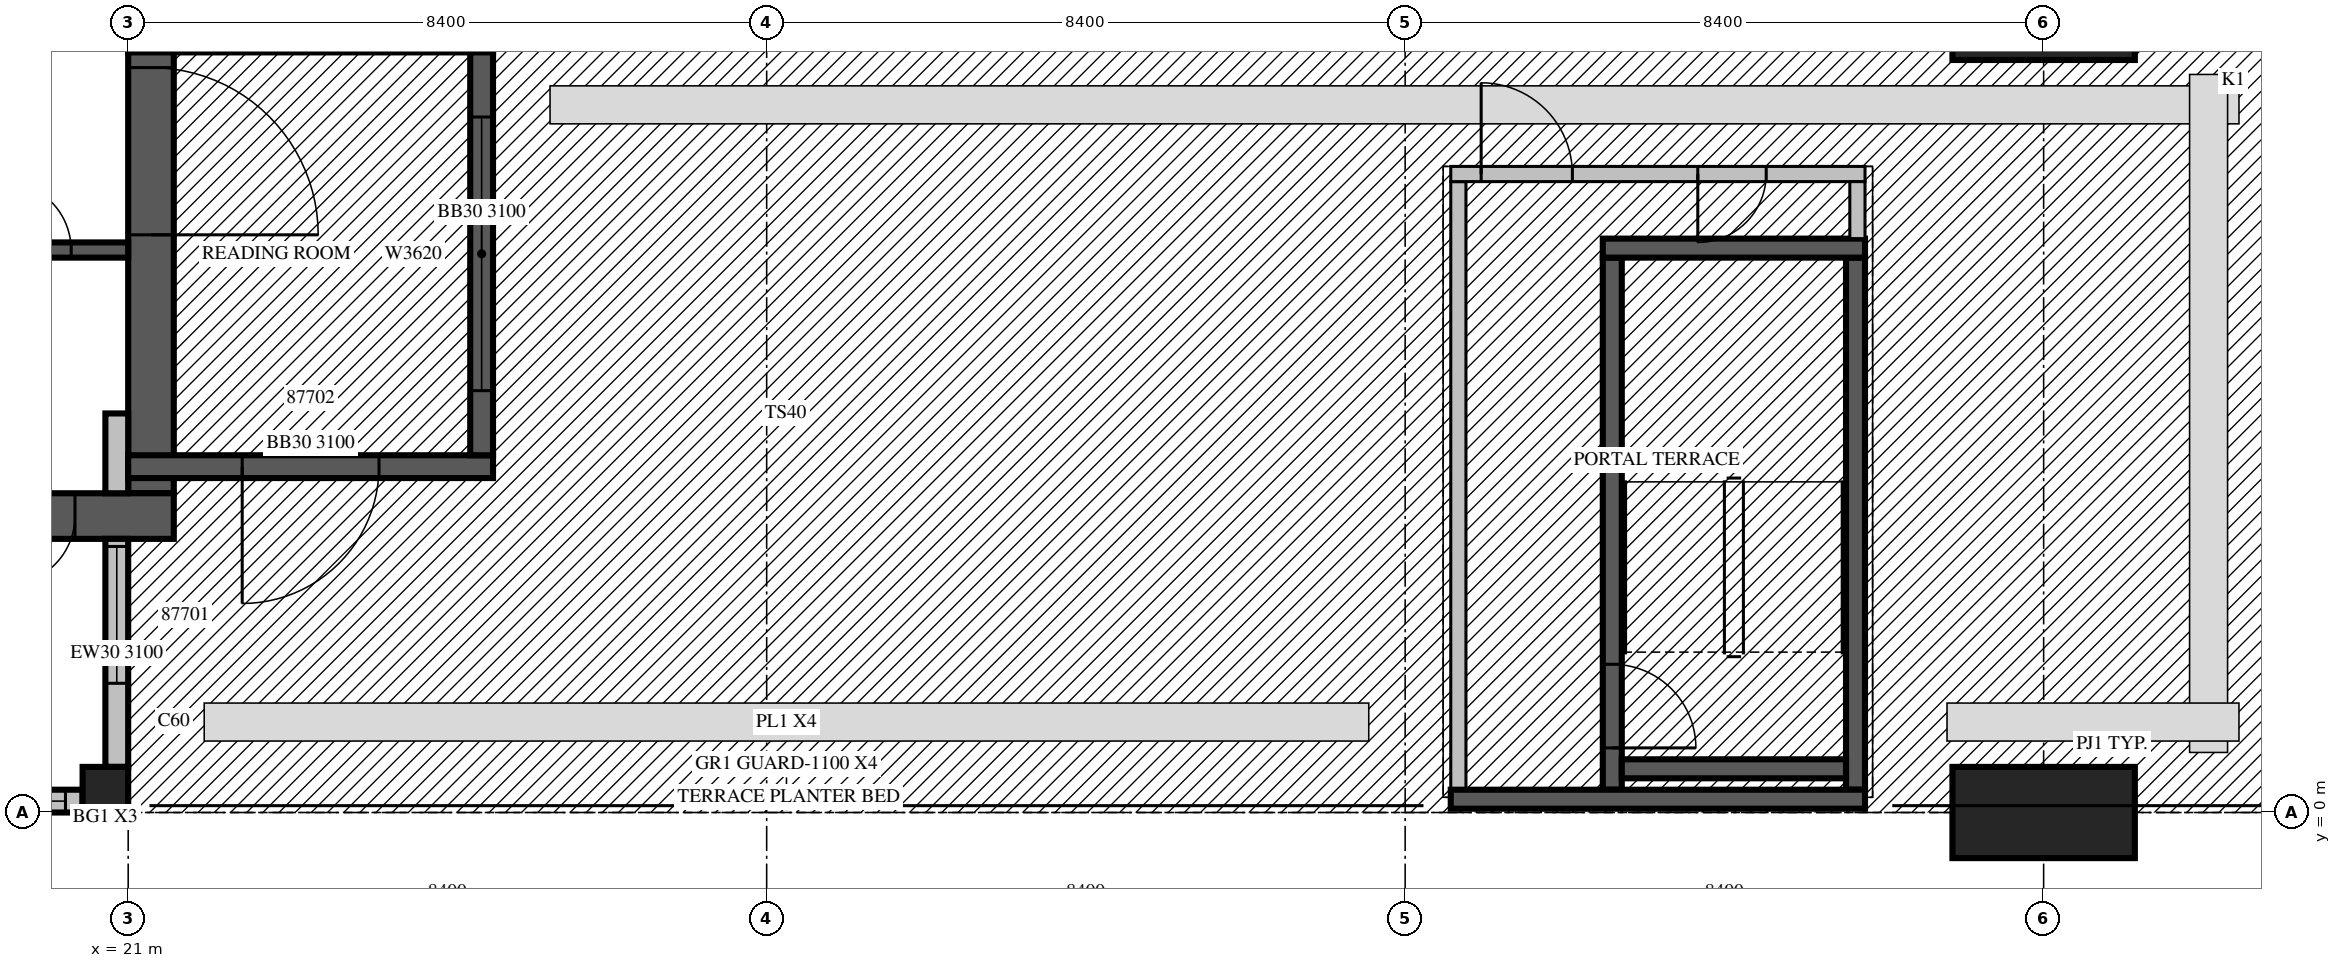
"""IFC4 building model, lengths in metres.
Left out: names, types, materials, properties, quantities, classifications, styles, units other than length and angle.
Written with IfcOpenShell. Run it as: python <this file> out.ifc"""

import sys

from ifc_helpers import new_model, si_unit, direction, frame, frame_2d, origin, origin_2d, place, context, subcontext, project, spatial, rectangle, extrude, source, transform, mapped, element, fill, save


model = new_model("IFC4")
c1 = context("Model", 3, precision=1e-05, world=origin(), true_north=direction((0.0, 1.0)))
c2 = subcontext(c1, "Body", "Model", "MODEL_VIEW")
j1 = project(units=[si_unit("LENGTHUNIT", "METRE"), si_unit("PLANEANGLEUNIT", "RADIAN")], contexts=[c1])
p1 = place(None, origin())
s1 = spatial("IfcSite", under=j1, at=p1, CompositionType="ELEMENT")
p2 = place(p1, origin())
s2 = spatial("IfcBuilding", under=s1, at=p2, CompositionType="ELEMENT")
p3 = place(p2, frame((0.0, 0.0, 330.0)))
s3 = spatial("IfcBuildingStorey", under=s2, at=p3, CompositionType="ELEMENT", Elevation=330.0)
m1 = source(origin(), c2, "Body", "SweptSolid", [
    extrude(rectangle(XDim=0.6, YDim=0.6, at=origin_2d()), origin(), (0.0, 0.0, 1.0), 3.5),
])
p4 = place(p3, frame((20.7, 0.3, 0.0), z_axis=(0.0, 0.0, 1.0), x_axis=(1.0, 0.0, 0.0)))
e1 = element("IfcColumn", 1, at=p4, inside=s3, PredefinedType="COLUMN", context=c2, shape_type="MappedRepresentation", body=[
    mapped(m1, transform((0.0, 0.0, 0.0), scale=1.0)),
])
p5 = place(p3, frame((46.2, 0.0, 0.0), z_axis=(0.0, 0.0, 1.0), x_axis=(1.0, 0.0, 0.0)))
e2 = element("IfcColumn", 2, at=p5, inside=s3, PredefinedType="PILASTER", context=c2, shape_type="SweptSolid", body=[
    extrude(rectangle(XDim=2.4, YDim=1.2, at=origin_2d()), origin(), (0.0, 0.0, 1.0), 3.5),
])
m2 = source(origin(), c2, "Body", "SweptSolid", [
    extrude(rectangle(XDim=2.4, YDim=1.2, at=origin_2d()), origin(), (0.0, 0.0, 1.0), 3.5),
])
p6 = place(p3, frame((46.2, 10.5, 0.0), z_axis=(0.0, 0.0, 1.0), x_axis=(1.0, 0.0, 0.0)))
e3 = element("IfcColumn", 3, at=p6, inside=s3, PredefinedType="PILASTER", context=c2, shape_type="MappedRepresentation", body=[
    mapped(m2, transform((0.0, 0.0, 0.0), scale=1.0)),
])
m3 = source(origin(), c2, "Body", "SweptSolid", [
    extrude(rectangle(XDim=6.3, YDim=0.6, at=frame_2d((3.15, 0.0))), origin(), (0.0, 0.0, 1.0), 3.5),
])
p7 = place(p3, frame((21.3, 4.2, 0.0), z_axis=(0.0, 0.0, 1.0), x_axis=(0.0, 1.0, 0.0)))
e4 = element("IfcWall", 4, at=p7, inside=s3, PredefinedType="SHEAR", context=c2, shape_type="MappedRepresentation", body=[
    mapped(m3, transform((0.0, 0.0, 0.0), scale=1.0)),
])
m4 = source(origin(), c2, "Body", "SweptSolid", [
    extrude(rectangle(XDim=2.2, YDim=2.1, at=frame_2d((1.1, 1.05))), frame((0.0, 0.31, 0.0), z_axis=(0.0, -1.0, 0.0), x_axis=(1.0, 0.0, 0.0)), (0.0, 0.0, 1.0), 0.62),
])
p8 = place(p7, frame((3.4, 0.0, 0.0)))
e5 = element("IfcOpeningElement", 5, at=p8, cuts=e4, PredefinedType="OPENING", context=c2, shape_type="MappedRepresentation", body=[
    mapped(m4, transform((0.0, 0.0, 0.0), scale=1.0)),
])
m5 = source(origin(), c2, "Body", "SweptSolid", [
    extrude(rectangle(XDim=17.4, YDim=0.6, at=frame_2d((8.7, 0.0))), origin(), (0.0, 0.0, 1.0), 3.5),
])
p9 = place(p3, frame((4.2, 3.9, 0.0), z_axis=(0.0, 0.0, 1.0), x_axis=(1.0, 0.0, 0.0)))
e6 = element("IfcWall", 6, at=p9, inside=s3, PredefinedType="SHEAR", context=c2, shape_type="MappedRepresentation", body=[
    mapped(m5, transform((0.0, 0.0, 0.0), scale=1.0)),
])
m6 = source(origin(), c2, "Body", "SweptSolid", [
    extrude(rectangle(XDim=0.9, YDim=2.1, at=frame_2d((0.45, 1.05))), frame((0.0, 0.31, 0.0), z_axis=(0.0, -1.0, 0.0), x_axis=(1.0, 0.0, 0.0)), (0.0, 0.0, 1.0), 0.62),
])
p10 = place(p9, frame((15.2, 0.0, 0.0)))
e7 = element("IfcOpeningElement", 7, at=p10, cuts=e6, PredefinedType="OPENING", context=c2, shape_type="MappedRepresentation", body=[
    mapped(m6, transform((0.0, 0.0, 0.0), scale=1.0)),
])
p11 = place(p3, frame((10.8, 0.15, 0.0), z_axis=(0.0, 0.0, 1.0), x_axis=(1.0, 0.0, 0.0)))
e8 = element("IfcWall", 8, at=p11, inside=s3, PredefinedType="STANDARD", context=c2, shape_type="SweptSolid", body=[
    extrude(rectangle(XDim=9.6, YDim=0.3, at=frame_2d((4.8, 0.0))), origin(), (0.0, 0.0, 1.0), 2.6),
])
m7 = source(origin(), c2, "Body", "SweptSolid", [
    extrude(rectangle(XDim=3.6, YDim=2.0, at=frame_2d((1.8, 1.0))), frame((0.0, 0.16, 0.0), z_axis=(0.0, -1.0, 0.0), x_axis=(1.0, 0.0, 0.0)), (0.0, 0.0, 1.0), 0.32),
])
p12 = place(p11, frame((0.525, 0.0, 0.6)))
e9 = element("IfcOpeningElement", 9, at=p12, cuts=e8, PredefinedType="OPENING", context=c2, shape_type="MappedRepresentation", body=[
    mapped(m7, transform((0.0, 0.0, 0.0), scale=1.0)),
])
p13 = place(p11, frame((5.775, 0.0, 0.6)))
e10 = element("IfcOpeningElement", 10, at=p13, cuts=e8, PredefinedType="OPENING", context=c2, shape_type="MappedRepresentation", body=[
    mapped(m7, transform((0.0, 0.0, 0.0), scale=1.0)),
])
m8 = source(origin(), c2, "Body", "SweptSolid", [
    extrude(rectangle(XDim=3.0, YDim=0.3, at=frame_2d((1.5, 0.0))), origin(), (0.0, 0.0, 1.0), 3.1),
])
p14 = place(p3, frame((20.85, 0.6, 0.0), z_axis=(0.0, 0.0, 1.0), x_axis=(0.0, 1.0, 0.0)))
e11 = element("IfcWall", 11, at=p14, inside=s3, PredefinedType="STANDARD", context=c2, shape_type="MappedRepresentation", body=[
    mapped(m8, transform((0.0, 0.0, 0.0), scale=1.0)),
])
m9 = source(origin(), c2, "Body", "SweptSolid", [
    extrude(rectangle(XDim=1.8, YDim=2.4, at=frame_2d((0.9, 1.2))), frame((0.0, 0.16, 0.0), z_axis=(0.0, -1.0, 0.0), x_axis=(1.0, 0.0, 0.0)), (0.0, 0.0, 1.0), 0.32),
])
p15 = place(p14, frame((1.1, 0.0, 0.0)))
e12 = element("IfcOpeningElement", 12, at=p15, cuts=e11, PredefinedType="OPENING", context=c2, shape_type="MappedRepresentation", body=[
    mapped(m9, transform((0.0, 0.0, 0.0), scale=1.0)),
])
m10 = source(origin(), c2, "Body", "SweptSolid", [
    extrude(rectangle(XDim=1.05, YDim=0.3, at=frame_2d((0.525, 0.0))), origin(), (0.0, 0.0, 1.0), 3.1),
])
p16 = place(p3, frame((20.85, 4.2, 0.0), z_axis=(0.0, 0.0, 1.0), x_axis=(0.0, 1.0, 0.0)))
e13 = element("IfcWall", 13, at=p16, inside=s3, PredefinedType="STANDARD", context=c2, shape_type="MappedRepresentation", body=[
    mapped(m10, transform((0.0, 0.0, 0.0), scale=1.0)),
])
m11 = source(origin(), c2, "Body", "SweptSolid", [
    extrude(rectangle(XDim=4.8, YDim=0.3, at=frame_2d((2.4, 0.0))), origin(), (0.0, 0.0, 1.0), 3.1),
])
p17 = place(p3, frame((21.0, 4.55, 0.0), z_axis=(0.0, 0.0, 1.0), x_axis=(1.0, 0.0, 0.0)))
e14 = element("IfcWall", 14, at=p17, inside=s3, PredefinedType="SOLIDWALL", context=c2, shape_type="MappedRepresentation", body=[
    mapped(m11, transform((0.0, 0.0, 0.0), scale=1.0)),
])
p18 = place(p17, frame((1.5, 0.0, 0.0)))
e15 = element("IfcOpeningElement", 15, at=p18, cuts=e14, PredefinedType="OPENING", context=c2, shape_type="SweptSolid", body=[
    extrude(rectangle(XDim=1.8, YDim=2.1, at=frame_2d((0.9, 1.05))), frame((0.0, 0.16, 0.0), z_axis=(0.0, -1.0, 0.0), x_axis=(1.0, 0.0, 0.0)), (0.0, 0.0, 1.0), 0.32),
])
p19 = place(p3, frame((25.65, 4.7, 0.0), z_axis=(0.0, 0.0, 1.0), x_axis=(0.0, 1.0, 0.0)))
e16 = element("IfcWall", 16, at=p19, inside=s3, PredefinedType="SOLIDWALL", context=c2, shape_type="SweptSolid", body=[
    extrude(rectangle(XDim=5.3, YDim=0.3, at=frame_2d((2.65, 0.0))), origin(), (0.0, 0.0, 1.0), 3.1),
])
p20 = place(p19, frame((0.85, 0.0, 0.6)))
e17 = element("IfcOpeningElement", 17, at=p20, cuts=e16, PredefinedType="OPENING", context=c2, shape_type="MappedRepresentation", body=[
    mapped(m7, transform((0.0, 0.0, 0.0), scale=1.0)),
])
m12 = source(origin(), c2, "Body", "SweptSolid", [
    extrude(rectangle(XDim=7.2, YDim=0.2, at=frame_2d((3.6, 0.0))), origin(), (0.0, 0.0, 1.0), 3.1),
])
p21 = place(p3, frame((13.8, 7.4, 0.0), z_axis=(0.0, 0.0, 1.0), x_axis=(1.0, 0.0, 0.0)))
e18 = element("IfcWall", 18, at=p21, inside=s3, PredefinedType="SOLIDWALL", context=c2, shape_type="MappedRepresentation", body=[
    mapped(m12, transform((0.0, 0.0, 0.0), scale=1.0)),
])
m13 = source(origin(), c2, "Body", "SweptSolid", [
    extrude(rectangle(XDim=0.9, YDim=2.1, at=frame_2d((0.45, 1.05))), frame((0.0, 0.11, 0.0), z_axis=(0.0, -1.0, 0.0), x_axis=(1.0, 0.0, 0.0)), (0.0, 0.0, 1.0), 0.22),
])
p22 = place(p21, frame((0.75, 0.0, 0.0)))
e19 = element("IfcOpeningElement", 19, at=p22, cuts=e18, PredefinedType="OPENING", context=c2, shape_type="MappedRepresentation", body=[
    mapped(m13, transform((0.0, 0.0, 0.0), scale=1.0)),
])
p23 = place(p21, frame((3.15, 0.0, 0.0)))
e20 = element("IfcOpeningElement", 20, at=p23, cuts=e18, PredefinedType="OPENING", context=c2, shape_type="MappedRepresentation", body=[
    mapped(m13, transform((0.0, 0.0, 0.0), scale=1.0)),
])
p24 = place(p21, frame((5.55, 0.0, 0.0)))
e21 = element("IfcOpeningElement", 21, at=p24, cuts=e18, PredefinedType="OPENING", context=c2, shape_type="MappedRepresentation", body=[
    mapped(m13, transform((0.0, 0.0, 0.0), scale=1.0)),
])
m14 = source(origin(), c2, "Body", "SweptSolid", [
    extrude(rectangle(XDim=7.0, YDim=0.25, at=frame_2d((3.5, 0.0))), origin(), (0.0, 0.0, 1.0), 3.1),
])
p25 = place(p3, frame((40.525, 0.3, 0.0), z_axis=(0.0, 0.0, 1.0), x_axis=(0.0, 1.0, 0.0)))
e22 = element("IfcWall", 22, at=p25, inside=s3, PredefinedType="SOLIDWALL", context=c2, shape_type="MappedRepresentation", body=[
    mapped(m14, transform((0.0, 0.0, 0.0), scale=1.0)),
])
m15 = source(origin(), c2, "Body", "SweptSolid", [
    extrude(rectangle(XDim=1.1, YDim=2.1, at=frame_2d((0.55, 1.05))), frame((0.0, 0.135, 0.0), z_axis=(0.0, -1.0, 0.0), x_axis=(1.0, 0.0, 0.0)), (0.0, 0.0, 1.0), 0.27),
])
p26 = place(p25, frame((0.55, 0.0, 0.0)))
e23 = element("IfcOpeningElement", 23, at=p26, cuts=e22, PredefinedType="OPENING", context=c2, shape_type="MappedRepresentation", body=[
    mapped(m15, transform((0.0, 0.0, 0.0), scale=1.0)),
])
p27 = place(p3, frame((43.725, 0.3, 0.0), z_axis=(0.0, 0.0, 1.0), x_axis=(0.0, 1.0, 0.0)))
e24 = element("IfcWall", 24, at=p27, inside=s3, PredefinedType="SOLIDWALL", context=c2, shape_type="MappedRepresentation", body=[
    mapped(m14, transform((0.0, 0.0, 0.0), scale=1.0)),
])
m16 = source(origin(), c2, "Body", "SweptSolid", [
    extrude(rectangle(XDim=3.45, YDim=0.25, at=frame_2d((1.725, 0.0))), origin(), (0.0, 0.0, 1.0), 3.1),
])
p28 = place(p3, frame((40.4, 7.425, 0.0), z_axis=(0.0, 0.0, 1.0), x_axis=(1.0, 0.0, 0.0)))
e25 = element("IfcWall", 25, at=p28, inside=s3, PredefinedType="SOLIDWALL", context=c2, shape_type="MappedRepresentation", body=[
    mapped(m16, transform((0.0, 0.0, 0.0), scale=1.0)),
])
m17 = source(origin(), c2, "Body", "SweptSolid", [
    extrude(rectangle(XDim=2.95, YDim=0.25, at=frame_2d((1.475, 0.0))), origin(), (0.0, 0.0, 1.0), 3.1),
])
p29 = place(p3, frame((40.65, 0.575, 0.0), z_axis=(0.0, 0.0, 1.0), x_axis=(1.0, 0.0, 0.0)))
e26 = element("IfcWall", 26, at=p29, inside=s3, PredefinedType="SOLIDWALL", context=c2, shape_type="MappedRepresentation", body=[
    mapped(m17, transform((0.0, 0.0, 0.0), scale=1.0)),
])
m18 = source(origin(), c2, "Body", "SweptSolid", [
    extrude(rectangle(XDim=8.0, YDim=0.2, at=frame_2d((4.0, 0.0))), origin(), (0.0, 0.0, 1.0), 3.1),
])
p30 = place(p3, frame((38.5, 0.3, 0.0), z_axis=(0.0, 0.0, 1.0), x_axis=(0.0, 1.0, 0.0)))
e27 = element("IfcWall", 27, at=p30, inside=s3, PredefinedType="PARTITIONING", context=c2, shape_type="MappedRepresentation", body=[
    mapped(m18, transform((0.0, 0.0, 0.0), scale=1.0)),
])
m19 = source(origin(), c2, "Body", "SweptSolid", [
    extrude(rectangle(XDim=5.45, YDim=0.2, at=frame_2d((2.725, 0.0))), origin(), (0.0, 0.0, 1.0), 3.1),
])
p31 = place(p3, frame((38.4, 8.4, 0.0), z_axis=(0.0, 0.0, 1.0), x_axis=(1.0, 0.0, 0.0)))
e28 = element("IfcWall", 28, at=p31, inside=s3, PredefinedType="PARTITIONING", context=c2, shape_type="MappedRepresentation", body=[
    mapped(m19, transform((0.0, 0.0, 0.0), scale=1.0)),
])
m20 = source(origin(), c2, "Body", "SweptSolid", [
    extrude(rectangle(XDim=1.2, YDim=2.1, at=frame_2d((0.6, 1.05))), frame((0.0, 0.11, 0.0), z_axis=(0.0, -1.0, 0.0), x_axis=(1.0, 0.0, 0.0)), (0.0, 0.0, 1.0), 0.22),
])
p32 = place(p31, frame((0.4, 0.0, 0.0)))
e29 = element("IfcOpeningElement", 29, at=p32, cuts=e28, PredefinedType="OPENING", context=c2, shape_type="MappedRepresentation", body=[
    mapped(m20, transform((0.0, 0.0, 0.0), scale=1.0)),
])
p33 = place(p31, frame((3.25, 0.0, 0.0)))
e30 = element("IfcOpeningElement", 30, at=p33, cuts=e28, PredefinedType="OPENING", context=c2, shape_type="MappedRepresentation", body=[
    mapped(m13, transform((0.0, 0.0, 0.0), scale=1.0)),
])
m21 = source(origin(), c2, "Body", "SweptSolid", [
    extrude(rectangle(XDim=0.75, YDim=0.2, at=frame_2d((0.375, 0.0))), origin(), (0.0, 0.0, 1.0), 3.1),
])
p34 = place(p3, frame((43.75, 7.55, 0.0), z_axis=(0.0, 0.0, 1.0), x_axis=(0.0, 1.0, 0.0)))
e31 = element("IfcWall", 31, at=p34, inside=s3, PredefinedType="PARTITIONING", context=c2, shape_type="MappedRepresentation", body=[
    mapped(m21, transform((0.0, 0.0, 0.0), scale=1.0)),
])
p35 = place(p3, frame((38.4, 0.175, 0.0), z_axis=(0.0, 0.0, 1.0), x_axis=(1.0, 0.0, 0.0)))
e32 = element("IfcWall", 32, at=p35, inside=s3, PredefinedType="SOLIDWALL", context=c2, shape_type="SweptSolid", body=[
    extrude(rectangle(XDim=5.45, YDim=0.25, at=frame_2d((2.725, 0.0))), origin(), (0.0, 0.0, 1.0), 3.1),
])
m22 = source(origin(), c2, "Body", "SweptSolid", [
    extrude(rectangle(XDim=3.6, YDim=2.0, at=frame_2d((1.8, 1.0))), frame((0.0, 0.03, 0.0), z_axis=(0.0, -1.0, 0.0), x_axis=(1.0, 0.0, 0.0)), (0.0, 0.0, 1.0), 0.06),
])
p36 = place(p13, origin())
e33 = element("IfcWindow", 33, at=p36, inside=s3, PartitioningType="SINGLE_PANEL", PredefinedType="WINDOW", context=c2, shape_type="MappedRepresentation", body=[
    mapped(m22, transform((0.0, 0.0, 0.0), scale=1.0)),
])
fill(e10, e33)
m23 = source(origin(), c2, "Body", "SweptSolid", [
    extrude(rectangle(XDim=1.8, YDim=2.4, at=frame_2d((0.9, 1.2))), frame((0.0, 0.025, 0.0), z_axis=(0.0, -1.0, 0.0), x_axis=(1.0, 0.0, 0.0)), (0.0, 0.0, 1.0), 0.05),
])
p37 = place(p15, origin())
e34 = element("IfcDoor", 34, at=p37, inside=s3, OperationType="SLIDING_TO_LEFT", PredefinedType="DOOR", context=c2, shape_type="MappedRepresentation", body=[
    mapped(m23, transform((0.0, 0.0, 0.0), scale=1.0)),
])
fill(e12, e34)
p38 = place(p18, origin())
e35 = element("IfcDoor", 35, at=p38, inside=s3, OperationType="DOUBLE_DOOR_SINGLE_SWING", PredefinedType="DOOR", context=c2, shape_type="SweptSolid", body=[
    extrude(rectangle(XDim=1.8, YDim=2.1, at=frame_2d((0.9, 1.05))), frame((0.0, 0.025, 0.0), z_axis=(0.0, -1.0, 0.0), x_axis=(1.0, 0.0, 0.0)), (0.0, 0.0, 1.0), 0.05),
])
fill(e15, e35)
p39 = place(p20, origin())
e36 = element("IfcWindow", 36, at=p39, inside=s3, PartitioningType="SINGLE_PANEL", PredefinedType="WINDOW", context=c2, shape_type="MappedRepresentation", body=[
    mapped(m22, transform((0.0, 0.0, 0.0), scale=1.0)),
])
fill(e17, e36)
m24 = source(origin(), c2, "Body", "SweptSolid", [
    extrude(rectangle(XDim=0.9, YDim=2.1, at=frame_2d((0.45, 1.05))), frame((0.0, 0.025, 0.0), z_axis=(0.0, -1.0, 0.0), x_axis=(1.0, 0.0, 0.0)), (0.0, 0.0, 1.0), 0.05),
])
p40 = place(p24, origin())
e37 = element("IfcDoor", 37, at=p40, inside=s3, OperationType="SINGLE_SWING_LEFT", PredefinedType="DOOR", context=c2, shape_type="MappedRepresentation", body=[
    mapped(m24, transform((0.0, 0.0, 0.0), scale=1.0)),
])
fill(e21, e37)
m25 = source(origin(), c2, "Body", "SweptSolid", [
    extrude(rectangle(XDim=1.1, YDim=2.1, at=frame_2d((0.55, 1.05))), frame((0.0, 0.025, 0.0), z_axis=(0.0, -1.0, 0.0), x_axis=(1.0, 0.0, 0.0)), (0.0, 0.0, 1.0), 0.05),
])
p41 = place(p26, origin())
e38 = element("IfcDoor", 38, at=p41, inside=s3, OperationType="SINGLE_SWING_RIGHT", PredefinedType="DOOR", context=c2, shape_type="MappedRepresentation", body=[
    mapped(m25, transform((0.0, 0.0, 0.0), scale=1.0)),
])
fill(e23, e38)
m26 = source(origin(), c2, "Body", "SweptSolid", [
    extrude(rectangle(XDim=1.2, YDim=2.1, at=frame_2d((0.6, 1.05))), frame((0.0, 0.025, 0.0), z_axis=(0.0, -1.0, 0.0), x_axis=(1.0, 0.0, 0.0)), (0.0, 0.0, 1.0), 0.05),
])
p42 = place(p32, origin())
e39 = element("IfcDoor", 39, at=p42, inside=s3, OperationType="SINGLE_SWING_LEFT", PredefinedType="DOOR", context=c2, shape_type="MappedRepresentation", body=[
    mapped(m26, transform((0.0, 0.0, 0.0), scale=1.0)),
])
fill(e29, e39)
p43 = place(p33, origin())
e40 = element("IfcDoor", 40, at=p43, inside=s3, OperationType="SINGLE_SWING_RIGHT", PredefinedType="DOOR", context=c2, shape_type="MappedRepresentation", body=[
    mapped(m24, transform((0.0, 0.0, 0.0), scale=1.0)),
])
fill(e30, e40)
m27 = source(origin(), c2, "Body", "SweptSolid", [
    extrude(rectangle(XDim=2.2, YDim=2.1, at=frame_2d((1.1, 1.05))), frame((0.0, 0.025, 0.0), z_axis=(0.0, -1.0, 0.0), x_axis=(1.0, 0.0, 0.0)), (0.0, 0.0, 1.0), 0.05),
])
p44 = place(p8, origin())
e41 = element("IfcDoor", 41, at=p44, inside=s3, OperationType="DOUBLE_DOOR_SINGLE_SWING", PredefinedType="DOOR", context=c2, shape_type="MappedRepresentation", body=[
    mapped(m27, transform((0.0, 0.0, 0.0), scale=1.0)),
])
fill(e5, e41)
p45 = place(p10, origin())
e42 = element("IfcDoor", 42, at=p45, inside=s3, OperationType="SINGLE_SWING_RIGHT", PredefinedType="DOOR", context=c2, shape_type="MappedRepresentation", body=[
    mapped(m24, transform((0.0, 0.0, 0.0), scale=1.0)),
])
fill(e7, e42)
save(model, sys.argv[1])
